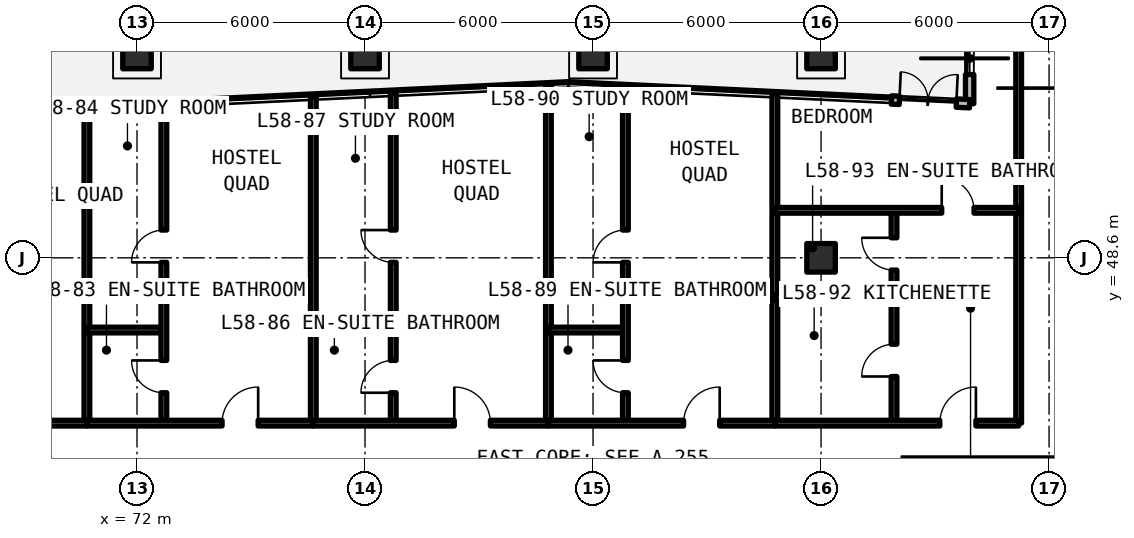
"""IFC4 building model, lengths in metres.
Left out: names, types, materials, properties, quantities, classifications, styles, units other than length and angle.
Written with IfcOpenShell. Run it as: python <this file> out.ifc"""

import sys

from ifc_helpers import new_model, si_unit, direction, frame, frame_2d, origin, origin_2d, place, context, subcontext, project, spatial, rectangle, extrude, element, fill, save


model = new_model("IFC4")
c1 = context("Model", 3, precision=1e-05, world=origin(), true_north=direction((0.0, 1.0)))
c2 = subcontext(c1, "Body", "Model", "MODEL_VIEW")
j1 = project(units=[si_unit("LENGTHUNIT", "METRE"), si_unit("PLANEANGLEUNIT", "RADIAN")], contexts=[c1])
p1 = place(None, origin())
s1 = spatial("IfcSite", under=j1, at=p1, CompositionType="ELEMENT")
p2 = place(p1, origin())
s2 = spatial("IfcBuilding", under=s1, at=p2, CompositionType="ELEMENT")
p3 = place(p2, frame((0.0, 0.0, 208.23)))
s3 = spatial("IfcBuildingStorey", under=s2, at=p3, CompositionType="ELEMENT", Elevation=208.23)
for number, where, z_axis, x_axis in (
    (1, (90.0, 48.6, 0.0), (0.0, 0.0, 1.0), (1.0, 0.0, 0.0)),
    (2, (72.0, 53.95, 0.0), (0.0, 0.0, 1.0), (1.0, 0.0, 0.0)),
    (3, (78.0, 53.95, 0.0), (0.0, 0.0, 1.0), (1.0, 0.0, 0.0)),
    (4, (84.0, 53.95, 0.0), (0.0, 0.0, 1.0), (1.0, 0.0, 0.0)),
    (5, (90.0, 53.95, 0.0), (0.0, 0.0, 1.0), (1.0, 0.0, 0.0)),
):
    element("IfcColumn", number, at=place(p3, frame(where, z_axis=z_axis, x_axis=x_axis)), inside=s3, PredefinedType="COLUMN", context=c2, shape_type="SweptSolid", body=[
        extrude(rectangle(XDim=0.75, YDim=0.75, at=origin_2d()), origin(), (0.0, 0.0, 1.0), 3.63),
    ])
p4 = place(p3, frame((99.49, 50.904, 0.0), z_axis=(0.0, 0.0, 1.0), x_axis=(-0.707085909342, 0.707127652415, 0.0)))
e6 = element("IfcWall", 6, at=p4, inside=s3, PredefinedType="SOLIDWALL", context=c2, shape_type="SweptSolid", body=[
    extrude(rectangle(XDim=5.849, YDim=0.22, at=frame_2d((2.924, 0.0))), origin(), (0.0, 0.0, 1.0), 3.41),
])
p5 = place(p4, frame((1.224, 0.0, 0.78)))
e7 = element("IfcOpeningElement", 7, at=p5, cuts=e6, PredefinedType="OPENING", context=c2, shape_type="SweptSolid", body=[
    extrude(rectangle(XDim=3.4, YDim=1.66, at=frame_2d((1.7, 0.83))), frame((0.0, 0.12, 0.0), z_axis=(0.0, -1.0, 0.0), x_axis=(1.0, 0.0, 0.0)), (0.0, 0.0, 1.0), 0.24),
])
p6 = place(p3, frame((93.91, 55.04, 0.0), z_axis=(0.0, 0.0, 1.0), x_axis=(0.0, -1.0, 0.0)))
e8 = element("IfcWall", 8, at=p6, inside=s3, PredefinedType="SOLIDWALL", context=c2, shape_type="SweptSolid", body=[
    extrude(rectangle(XDim=2.385, YDim=0.22, at=frame_2d((1.193, 0.0))), origin(), (0.0, 0.0, 1.0), 3.41),
])
p7 = place(p6, frame((0.768, 0.0, 0.78)))
e9 = element("IfcOpeningElement", 9, at=p7, cuts=e8, PredefinedType="OPENING", context=c2, shape_type="SweptSolid", body=[
    extrude(rectangle(XDim=0.85, YDim=1.65, at=frame_2d((0.425, 0.825))), frame((0.0, 0.12, 0.0), z_axis=(0.0, -1.0, 0.0), x_axis=(1.0, 0.0, 0.0)), (0.0, 0.0, 1.0), 0.24),
])
p8 = place(p3, frame((93.91, 52.655, 0.0), z_axis=(0.0, 0.0, 1.0), x_axis=(-0.998853072347, 0.047880474754, 0.0)))
e10 = element("IfcWall", 10, at=p8, inside=s3, PredefinedType="SOLIDWALL", context=c2, shape_type="SweptSolid", body=[
    extrude(rectangle(XDim=2.06, YDim=0.22, at=frame_2d((1.03, 0.0))), origin(), (0.0, 0.0, 1.0), 3.41),
])
p9 = place(p8, frame((0.35, 0.0, 0.0)))
e11 = element("IfcOpeningElement", 11, at=p9, cuts=e10, PredefinedType="OPENING", context=c2, shape_type="SweptSolid", body=[
    extrude(rectangle(XDim=1.5, YDim=2.2, at=frame_2d((0.75, 1.1))), frame((0.0, 0.12, 0.0), z_axis=(0.0, -1.0, 0.0), x_axis=(1.0, 0.0, 0.0)), (0.0, 0.0, 1.0), 0.24),
])
p10 = place(p3, frame((95.2, 44.25, 0.0), z_axis=(0.0, 0.0, 1.0), x_axis=(0.0, 1.0, 0.0)))
e12 = element("IfcWall", 12, at=p10, inside=s3, PredefinedType="SOLIDWALL", context=c2, shape_type="SweptSolid", body=[
    extrude(rectangle(XDim=10.79, YDim=0.15, at=frame_2d((5.395, 0.0))), origin(), (0.0, 0.0, 1.0), 2.63),
])
p11 = place(p3, frame((70.681, 44.25, 0.0), z_axis=(0.0, 0.0, 1.0), x_axis=(0.0, 1.0, 0.0)))
e13 = element("IfcWall", 13, at=p11, inside=s3, PredefinedType="SOLIDWALL", context=c2, shape_type="SweptSolid", body=[
    extrude(rectangle(XDim=8.304, YDim=0.15, at=frame_2d((4.152, 0.0))), origin(), (0.0, 0.0, 1.0), 2.63),
])
p12 = place(p3, frame((64.265, 44.25, 0.0), z_axis=(0.0, 0.0, 1.0), x_axis=(1.0, 0.0, 0.0)))
e14 = element("IfcWall", 14, at=p12, inside=s3, PredefinedType="SOLIDWALL", context=c2, shape_type="SweptSolid", body=[
    extrude(rectangle(XDim=6.416, YDim=0.15, at=frame_2d((3.208, 0.0))), origin(), (0.0, 0.0, 1.0), 2.63),
])
p13 = place(p12, frame((3.864, 0.0, 0.0)))
e15 = element("IfcOpeningElement", 15, at=p13, cuts=e14, PredefinedType="OPENING", context=c2, shape_type="SweptSolid", body=[
    extrude(rectangle(XDim=0.95, YDim=2.15, at=frame_2d((0.475, 1.075))), frame((0.0, 0.085, 0.0), z_axis=(0.0, -1.0, 0.0), x_axis=(1.0, 0.0, 0.0)), (0.0, 0.0, 1.0), 0.17),
])
p14 = place(p3, frame((76.639, 44.25, 0.0), z_axis=(0.0, 0.0, 1.0), x_axis=(0.0, 1.0, 0.0)))
e16 = element("IfcWall", 16, at=p14, inside=s3, PredefinedType="SOLIDWALL", context=c2, shape_type="SweptSolid", body=[
    extrude(rectangle(XDim=8.589, YDim=0.15, at=frame_2d((4.294, 0.0))), origin(), (0.0, 0.0, 1.0), 2.63),
])
p15 = place(p3, frame((70.681, 46.7, 0.0), z_axis=(0.0, 0.0, 1.0), x_axis=(1.0, 0.0, 0.0)))
e17 = element("IfcWall", 17, at=p15, inside=s3, PredefinedType="PARTITIONING", context=c2, shape_type="SweptSolid", body=[
    extrude(rectangle(XDim=2.026, YDim=0.15, at=frame_2d((1.013, 0.0))), origin(), (0.0, 0.0, 1.0), 2.63),
])
p16 = place(p3, frame((72.707, 44.25, 0.0), z_axis=(0.0, 0.0, 1.0), x_axis=(0.0, 1.0, 0.0)))
e18 = element("IfcWall", 18, at=p16, inside=s3, PredefinedType="PARTITIONING", context=c2, shape_type="SweptSolid", body=[
    extrude(rectangle(XDim=8.401, YDim=0.15, at=frame_2d((4.2, 0.0))), origin(), (0.0, 0.0, 1.0), 2.63),
])
p17 = place(p16, frame((0.8, 0.0, 0.0)))
e19 = element("IfcOpeningElement", 19, at=p17, cuts=e18, PredefinedType="OPENING", context=c2, shape_type="SweptSolid", body=[
    extrude(rectangle(XDim=0.85, YDim=2.1, at=frame_2d((0.425, 1.05))), frame((0.0, 0.085, 0.0), z_axis=(0.0, -1.0, 0.0), x_axis=(1.0, 0.0, 0.0)), (0.0, 0.0, 1.0), 0.17),
])
p18 = place(p16, frame((4.23, 0.0, 0.0)))
e20 = element("IfcOpeningElement", 20, at=p18, cuts=e18, PredefinedType="OPENING", context=c2, shape_type="SweptSolid", body=[
    extrude(rectangle(XDim=0.85, YDim=2.1, at=frame_2d((0.425, 1.05))), frame((0.0, 0.085, 0.0), z_axis=(0.0, -1.0, 0.0), x_axis=(1.0, 0.0, 0.0)), (0.0, 0.0, 1.0), 0.17),
])
p19 = place(p3, frame((70.681, 44.25, 0.0), z_axis=(0.0, 0.0, 1.0), x_axis=(1.0, 0.0, 0.0)))
e21 = element("IfcWall", 21, at=p19, inside=s3, PredefinedType="SOLIDWALL", context=c2, shape_type="SweptSolid", body=[
    extrude(rectangle(XDim=5.958, YDim=0.15, at=frame_2d((2.979, 0.0))), origin(), (0.0, 0.0, 1.0), 2.63),
])
p20 = place(p19, frame((3.557, 0.0, 0.0)))
e22 = element("IfcOpeningElement", 22, at=p20, cuts=e21, PredefinedType="OPENING", context=c2, shape_type="SweptSolid", body=[
    extrude(rectangle(XDim=0.95, YDim=2.15, at=frame_2d((0.475, 1.075))), frame((0.0, 0.085, 0.0), z_axis=(0.0, -1.0, 0.0), x_axis=(1.0, 0.0, 0.0)), (0.0, 0.0, 1.0), 0.17),
])
p21 = place(p3, frame((82.826, 44.25, 0.0), z_axis=(0.0, 0.0, 1.0), x_axis=(0.0, 1.0, 0.0)))
e23 = element("IfcWall", 23, at=p21, inside=s3, PredefinedType="SOLIDWALL", context=c2, shape_type="SweptSolid", body=[
    extrude(rectangle(XDim=8.885, YDim=0.15, at=frame_2d((4.442, 0.0))), origin(), (0.0, 0.0, 1.0), 2.63),
])
p22 = place(p3, frame((76.639, 46.7, 0.0), z_axis=(0.0, 0.0, 1.0), x_axis=(1.0, 0.0, 0.0)))
e24 = element("IfcWall", 24, at=p22, inside=s3, PredefinedType="PARTITIONING", context=c2, shape_type="SweptSolid", body=[
    extrude(rectangle(XDim=2.104, YDim=0.15, at=frame_2d((1.052, 0.0))), origin(), (0.0, 0.0, 1.0), 2.63),
])
p23 = place(p3, frame((78.743, 44.25, 0.0), z_axis=(0.0, 0.0, 1.0), x_axis=(0.0, 1.0, 0.0)))
e25 = element("IfcWall", 25, at=p23, inside=s3, PredefinedType="PARTITIONING", context=c2, shape_type="SweptSolid", body=[
    extrude(rectangle(XDim=8.689, YDim=0.15, at=frame_2d((4.345, 0.0))), origin(), (0.0, 0.0, 1.0), 2.63),
])
p24 = place(p23, frame((0.8, 0.0, 0.0)))
e26 = element("IfcOpeningElement", 26, at=p24, cuts=e25, PredefinedType="OPENING", context=c2, shape_type="SweptSolid", body=[
    extrude(rectangle(XDim=0.85, YDim=2.1, at=frame_2d((0.425, 1.05))), frame((0.0, 0.085, 0.0), z_axis=(0.0, -1.0, 0.0), x_axis=(1.0, 0.0, 0.0)), (0.0, 0.0, 1.0), 0.17),
])
p25 = place(p23, frame((4.23, 0.0, 0.0)))
e27 = element("IfcOpeningElement", 27, at=p25, cuts=e25, PredefinedType="OPENING", context=c2, shape_type="SweptSolid", body=[
    extrude(rectangle(XDim=0.85, YDim=2.1, at=frame_2d((0.425, 1.05))), frame((0.0, 0.085, 0.0), z_axis=(0.0, -1.0, 0.0), x_axis=(1.0, 0.0, 0.0)), (0.0, 0.0, 1.0), 0.17),
])
p26 = place(p3, frame((76.639, 44.25, 0.0), z_axis=(0.0, 0.0, 1.0), x_axis=(1.0, 0.0, 0.0)))
e28 = element("IfcWall", 28, at=p26, inside=s3, PredefinedType="SOLIDWALL", context=c2, shape_type="SweptSolid", body=[
    extrude(rectangle(XDim=6.187, YDim=0.15, at=frame_2d((3.094, 0.0))), origin(), (0.0, 0.0, 1.0), 2.63),
])
p27 = place(p26, frame((3.71, 0.0, 0.0)))
e29 = element("IfcOpeningElement", 29, at=p27, cuts=e28, PredefinedType="OPENING", context=c2, shape_type="SweptSolid", body=[
    extrude(rectangle(XDim=0.95, YDim=2.15, at=frame_2d((0.475, 1.075))), frame((0.0, 0.085, 0.0), z_axis=(0.0, -1.0, 0.0), x_axis=(1.0, 0.0, 0.0)), (0.0, 0.0, 1.0), 0.17),
])
p28 = place(p3, frame((88.784, 44.25, 0.0), z_axis=(0.0, 0.0, 1.0), x_axis=(0.0, 1.0, 0.0)))
e30 = element("IfcWall", 30, at=p28, inside=s3, PredefinedType="SOLIDWALL", context=c2, shape_type="SweptSolid", body=[
    extrude(rectangle(XDim=8.65, YDim=0.15, at=frame_2d((4.325, 0.0))), origin(), (0.0, 0.0, 1.0), 2.63),
])
p29 = place(p3, frame((82.826, 46.7, 0.0), z_axis=(0.0, 0.0, 1.0), x_axis=(1.0, 0.0, 0.0)))
e31 = element("IfcWall", 31, at=p29, inside=s3, PredefinedType="PARTITIONING", context=c2, shape_type="SweptSolid", body=[
    extrude(rectangle(XDim=2.026, YDim=0.15, at=frame_2d((1.013, 0.0))), origin(), (0.0, 0.0, 1.0), 2.63),
])
p30 = place(p3, frame((84.852, 44.25, 0.0), z_axis=(0.0, 0.0, 1.0), x_axis=(0.0, 1.0, 0.0)))
e32 = element("IfcWall", 32, at=p30, inside=s3, PredefinedType="PARTITIONING", context=c2, shape_type="SweptSolid", body=[
    extrude(rectangle(XDim=8.838, YDim=0.15, at=frame_2d((4.419, 0.0))), origin(), (0.0, 0.0, 1.0), 2.63),
])
p31 = place(p30, frame((0.8, 0.0, 0.0)))
e33 = element("IfcOpeningElement", 33, at=p31, cuts=e32, PredefinedType="OPENING", context=c2, shape_type="SweptSolid", body=[
    extrude(rectangle(XDim=0.85, YDim=2.1, at=frame_2d((0.425, 1.05))), frame((0.0, 0.085, 0.0), z_axis=(0.0, -1.0, 0.0), x_axis=(1.0, 0.0, 0.0)), (0.0, 0.0, 1.0), 0.17),
])
p32 = place(p30, frame((4.23, 0.0, 0.0)))
e34 = element("IfcOpeningElement", 34, at=p32, cuts=e32, PredefinedType="OPENING", context=c2, shape_type="SweptSolid", body=[
    extrude(rectangle(XDim=0.85, YDim=2.1, at=frame_2d((0.425, 1.05))), frame((0.0, 0.085, 0.0), z_axis=(0.0, -1.0, 0.0), x_axis=(1.0, 0.0, 0.0)), (0.0, 0.0, 1.0), 0.17),
])
p33 = place(p3, frame((82.826, 44.25, 0.0), z_axis=(0.0, 0.0, 1.0), x_axis=(1.0, 0.0, 0.0)))
e35 = element("IfcWall", 35, at=p33, inside=s3, PredefinedType="SOLIDWALL", context=c2, shape_type="SweptSolid", body=[
    extrude(rectangle(XDim=5.958, YDim=0.15, at=frame_2d((2.979, 0.0))), origin(), (0.0, 0.0, 1.0), 2.63),
])
p34 = place(p33, frame((3.557, 0.0, 0.0)))
e36 = element("IfcOpeningElement", 36, at=p34, cuts=e35, PredefinedType="OPENING", context=c2, shape_type="SweptSolid", body=[
    extrude(rectangle(XDim=0.95, YDim=2.15, at=frame_2d((0.475, 1.075))), frame((0.0, 0.085, 0.0), z_axis=(0.0, -1.0, 0.0), x_axis=(1.0, 0.0, 0.0)), (0.0, 0.0, 1.0), 0.17),
])
p35 = place(p3, frame((88.784, 47.554, 0.0), z_axis=(0.0, 0.0, 1.0), x_axis=(1.0, 0.0, 0.0)))
e37 = element("IfcWall", 37, at=p35, inside=s3, PredefinedType="PARTITIONING", context=c2, shape_type="SweptSolid", body=[
    extrude(rectangle(XDim=3.136, YDim=0.15, at=frame_2d((1.568, 0.0))), origin(), (0.0, 0.0, 1.0), 2.63),
])
p36 = place(p3, frame((91.92, 44.25, 0.0), z_axis=(0.0, 0.0, 1.0), x_axis=(0.0, 1.0, 0.0)))
e38 = element("IfcWall", 38, at=p36, inside=s3, PredefinedType="PARTITIONING", context=c2, shape_type="SweptSolid", body=[
    extrude(rectangle(XDim=5.6, YDim=0.15, at=frame_2d((2.8, 0.0))), origin(), (0.0, 0.0, 1.0), 2.63),
])
p37 = place(p36, frame((1.227, 0.0, 0.0)))
e39 = element("IfcOpeningElement", 39, at=p37, cuts=e38, PredefinedType="OPENING", context=c2, shape_type="SweptSolid", body=[
    extrude(rectangle(XDim=0.85, YDim=2.1, at=frame_2d((0.425, 1.05))), frame((0.0, 0.085, 0.0), z_axis=(0.0, -1.0, 0.0), x_axis=(1.0, 0.0, 0.0)), (0.0, 0.0, 1.0), 0.17),
])
p38 = place(p36, frame((4.027, 0.0, 0.0)))
e40 = element("IfcOpeningElement", 40, at=p38, cuts=e38, PredefinedType="OPENING", context=c2, shape_type="SweptSolid", body=[
    extrude(rectangle(XDim=0.85, YDim=2.1, at=frame_2d((0.425, 1.05))), frame((0.0, 0.085, 0.0), z_axis=(0.0, -1.0, 0.0), x_axis=(1.0, 0.0, 0.0)), (0.0, 0.0, 1.0), 0.17),
])
p39 = place(p3, frame((88.784, 49.85, 0.0), z_axis=(0.0, 0.0, 1.0), x_axis=(1.0, 0.0, 0.0)))
e41 = element("IfcWall", 41, at=p39, inside=s3, PredefinedType="PARTITIONING", context=c2, shape_type="SweptSolid", body=[
    extrude(rectangle(XDim=6.416, YDim=0.15, at=frame_2d((3.208, 0.0))), origin(), (0.0, 0.0, 1.0), 2.63),
])
p40 = place(p39, frame((4.391, 0.0, 0.0)))
e42 = element("IfcOpeningElement", 42, at=p40, cuts=e41, PredefinedType="OPENING", context=c2, shape_type="SweptSolid", body=[
    extrude(rectangle(XDim=0.85, YDim=2.1, at=frame_2d((0.425, 1.05))), frame((0.0, 0.085, 0.0), z_axis=(0.0, -1.0, 0.0), x_axis=(1.0, 0.0, 0.0)), (0.0, 0.0, 1.0), 0.17),
])
p41 = place(p3, frame((88.784, 44.25, 0.0), z_axis=(0.0, 0.0, 1.0), x_axis=(1.0, 0.0, 0.0)))
e43 = element("IfcWall", 43, at=p41, inside=s3, PredefinedType="SOLIDWALL", context=c2, shape_type="SweptSolid", body=[
    extrude(rectangle(XDim=6.416, YDim=0.15, at=frame_2d((3.208, 0.0))), origin(), (0.0, 0.0, 1.0), 2.63),
])
p42 = place(p41, frame((4.341, 0.0, 0.0)))
e44 = element("IfcOpeningElement", 44, at=p42, cuts=e43, PredefinedType="OPENING", context=c2, shape_type="SweptSolid", body=[
    extrude(rectangle(XDim=0.95, YDim=2.15, at=frame_2d((0.475, 1.075))), frame((0.0, 0.085, 0.0), z_axis=(0.0, -1.0, 0.0), x_axis=(1.0, 0.0, 0.0)), (0.0, 0.0, 1.0), 0.17),
])
p43 = place(p7, origin())
e45 = element("IfcWindow", 45, at=p43, inside=s3, PartitioningType="SINGLE_PANEL", PredefinedType="WINDOW", context=c2, shape_type="SweptSolid", body=[
    extrude(rectangle(XDim=0.85, YDim=1.65, at=frame_2d((0.425, 0.825))), frame((0.0, 0.03, 0.0), z_axis=(0.0, -1.0, 0.0), x_axis=(1.0, 0.0, 0.0)), (0.0, 0.0, 1.0), 0.06),
])
fill(e9, e45)
p44 = place(p9, frame((1.5, 0.0, 0.0), z_axis=(0.0, 0.0, 1.0), x_axis=(-1.0, 0.0, 0.0)))
e46 = element("IfcDoor", 46, at=p44, inside=s3, OperationType="SINGLE_SWING_LEFT", PredefinedType="DOOR", context=c2, shape_type="SweptSolid", body=[
    extrude(rectangle(XDim=1.5, YDim=2.2, at=frame_2d((0.75, 1.1))), frame((0.0, 0.025, 0.0), z_axis=(0.0, -1.0, 0.0), x_axis=(1.0, 0.0, 0.0)), (0.0, 0.0, 1.0), 0.05),
])
fill(e11, e46)
p45 = place(p17, origin())
e47 = element("IfcDoor", 47, at=p45, inside=s3, OperationType="SINGLE_SWING_RIGHT", PredefinedType="DOOR", context=c2, shape_type="SweptSolid", body=[
    extrude(rectangle(XDim=0.85, YDim=2.1, at=frame_2d((0.425, 1.05))), frame((0.0, 0.025, 0.0), z_axis=(0.0, -1.0, 0.0), x_axis=(1.0, 0.0, 0.0)), (0.0, 0.0, 1.0), 0.05),
])
fill(e19, e47)
p46 = place(p18, origin())
e48 = element("IfcDoor", 48, at=p46, inside=s3, OperationType="SINGLE_SWING_LEFT", PredefinedType="DOOR", context=c2, shape_type="SweptSolid", body=[
    extrude(rectangle(XDim=0.85, YDim=2.1, at=frame_2d((0.425, 1.05))), frame((0.0, 0.025, 0.0), z_axis=(0.0, -1.0, 0.0), x_axis=(1.0, 0.0, 0.0)), (0.0, 0.0, 1.0), 0.05),
])
fill(e20, e48)
p47 = place(p20, origin())
e49 = element("IfcDoor", 49, at=p47, inside=s3, OperationType="SINGLE_SWING_RIGHT", PredefinedType="DOOR", context=c2, shape_type="SweptSolid", body=[
    extrude(rectangle(XDim=0.95, YDim=2.15, at=frame_2d((0.475, 1.075))), frame((0.0, 0.025, 0.0), z_axis=(0.0, -1.0, 0.0), x_axis=(1.0, 0.0, 0.0)), (0.0, 0.0, 1.0), 0.05),
])
fill(e22, e49)
p48 = place(p24, origin())
e50 = element("IfcDoor", 50, at=p48, inside=s3, OperationType="SINGLE_SWING_LEFT", PredefinedType="DOOR", context=c2, shape_type="SweptSolid", body=[
    extrude(rectangle(XDim=0.85, YDim=2.1, at=frame_2d((0.425, 1.05))), frame((0.0, 0.025, 0.0), z_axis=(0.0, -1.0, 0.0), x_axis=(1.0, 0.0, 0.0)), (0.0, 0.0, 1.0), 0.05),
])
fill(e26, e50)
p49 = place(p25, origin())
e51 = element("IfcDoor", 51, at=p49, inside=s3, OperationType="SINGLE_SWING_RIGHT", PredefinedType="DOOR", context=c2, shape_type="SweptSolid", body=[
    extrude(rectangle(XDim=0.85, YDim=2.1, at=frame_2d((0.425, 1.05))), frame((0.0, 0.025, 0.0), z_axis=(0.0, -1.0, 0.0), x_axis=(1.0, 0.0, 0.0)), (0.0, 0.0, 1.0), 0.05),
])
fill(e27, e51)
p50 = place(p27, origin())
e52 = element("IfcDoor", 52, at=p50, inside=s3, OperationType="SINGLE_SWING_LEFT", PredefinedType="DOOR", context=c2, shape_type="SweptSolid", body=[
    extrude(rectangle(XDim=0.95, YDim=2.15, at=frame_2d((0.475, 1.075))), frame((0.0, 0.025, 0.0), z_axis=(0.0, -1.0, 0.0), x_axis=(1.0, 0.0, 0.0)), (0.0, 0.0, 1.0), 0.05),
])
fill(e29, e52)
p51 = place(p31, origin())
e53 = element("IfcDoor", 53, at=p51, inside=s3, OperationType="SINGLE_SWING_RIGHT", PredefinedType="DOOR", context=c2, shape_type="SweptSolid", body=[
    extrude(rectangle(XDim=0.85, YDim=2.1, at=frame_2d((0.425, 1.05))), frame((0.0, 0.025, 0.0), z_axis=(0.0, -1.0, 0.0), x_axis=(1.0, 0.0, 0.0)), (0.0, 0.0, 1.0), 0.05),
])
fill(e33, e53)
p52 = place(p32, origin())
e54 = element("IfcDoor", 54, at=p52, inside=s3, OperationType="SINGLE_SWING_LEFT", PredefinedType="DOOR", context=c2, shape_type="SweptSolid", body=[
    extrude(rectangle(XDim=0.85, YDim=2.1, at=frame_2d((0.425, 1.05))), frame((0.0, 0.025, 0.0), z_axis=(0.0, -1.0, 0.0), x_axis=(1.0, 0.0, 0.0)), (0.0, 0.0, 1.0), 0.05),
])
fill(e34, e54)
p53 = place(p34, origin())
e55 = element("IfcDoor", 55, at=p53, inside=s3, OperationType="SINGLE_SWING_RIGHT", PredefinedType="DOOR", context=c2, shape_type="SweptSolid", body=[
    extrude(rectangle(XDim=0.95, YDim=2.15, at=frame_2d((0.475, 1.075))), frame((0.0, 0.025, 0.0), z_axis=(0.0, -1.0, 0.0), x_axis=(1.0, 0.0, 0.0)), (0.0, 0.0, 1.0), 0.05),
])
fill(e36, e55)
p54 = place(p37, origin())
e56 = element("IfcDoor", 56, at=p54, inside=s3, OperationType="SINGLE_SWING_LEFT", PredefinedType="DOOR", context=c2, shape_type="SweptSolid", body=[
    extrude(rectangle(XDim=0.85, YDim=2.1, at=frame_2d((0.425, 1.05))), frame((0.0, 0.025, 0.0), z_axis=(0.0, -1.0, 0.0), x_axis=(1.0, 0.0, 0.0)), (0.0, 0.0, 1.0), 0.05),
])
fill(e39, e56)
p55 = place(p38, origin())
e57 = element("IfcDoor", 57, at=p55, inside=s3, OperationType="SINGLE_SWING_RIGHT", PredefinedType="DOOR", context=c2, shape_type="SweptSolid", body=[
    extrude(rectangle(XDim=0.85, YDim=2.1, at=frame_2d((0.425, 1.05))), frame((0.0, 0.025, 0.0), z_axis=(0.0, -1.0, 0.0), x_axis=(1.0, 0.0, 0.0)), (0.0, 0.0, 1.0), 0.05),
])
fill(e40, e57)
p56 = place(p40, origin())
e58 = element("IfcDoor", 58, at=p56, inside=s3, OperationType="SINGLE_SWING_LEFT", PredefinedType="DOOR", context=c2, shape_type="SweptSolid", body=[
    extrude(rectangle(XDim=0.85, YDim=2.1, at=frame_2d((0.425, 1.05))), frame((0.0, 0.025, 0.0), z_axis=(0.0, -1.0, 0.0), x_axis=(1.0, 0.0, 0.0)), (0.0, 0.0, 1.0), 0.05),
])
fill(e42, e58)
p57 = place(p42, origin())
e59 = element("IfcDoor", 59, at=p57, inside=s3, OperationType="SINGLE_SWING_RIGHT", PredefinedType="DOOR", context=c2, shape_type="SweptSolid", body=[
    extrude(rectangle(XDim=0.95, YDim=2.15, at=frame_2d((0.475, 1.075))), frame((0.0, 0.025, 0.0), z_axis=(0.0, -1.0, 0.0), x_axis=(1.0, 0.0, 0.0)), (0.0, 0.0, 1.0), 0.05),
])
fill(e44, e59)
save(model, sys.argv[1])
